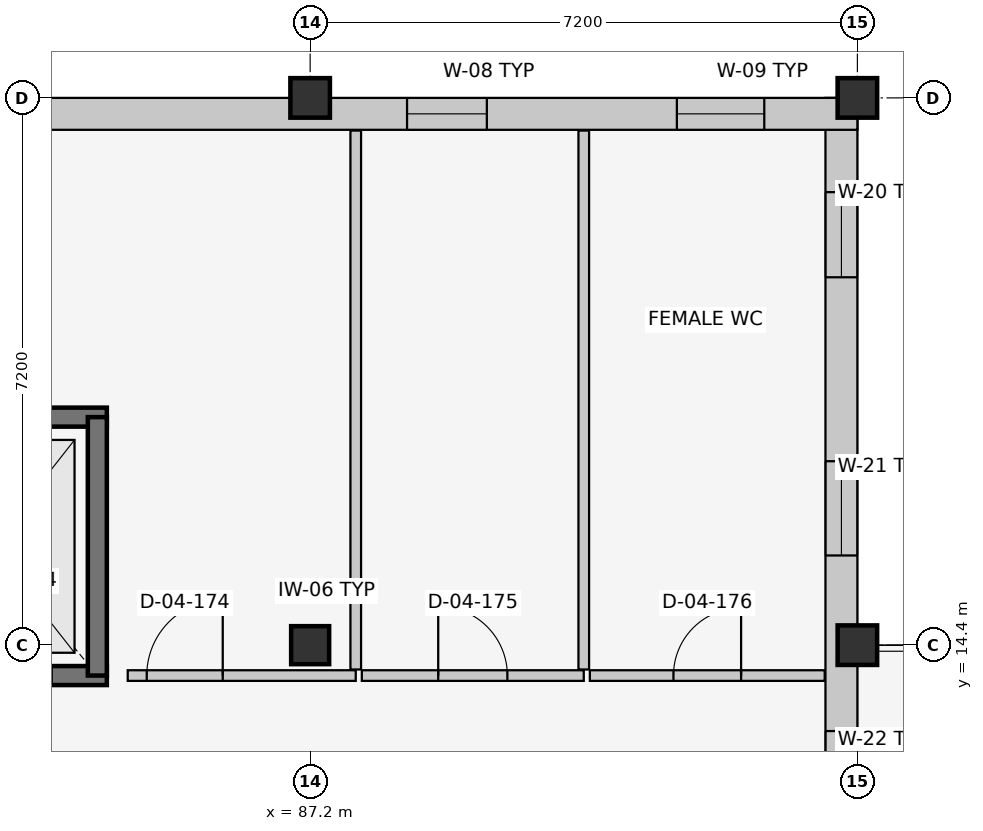
"""IFC4 building model, lengths in metres.
Left out: names, types, materials, properties, quantities, classifications, styles, units other than length and angle.
Written with IfcOpenShell. Run it as: python <this file> out.ifc"""

import sys

from ifc_helpers import new_model, si_unit, direction, frame, frame_2d, origin, origin_2d, place, context, subcontext, project, spatial, rectangle, extrude, element, fill, save


model = new_model("IFC4")
c1 = context("Model", 3, precision=1e-05, world=origin(), true_north=direction((0.0, 1.0)))
c2 = subcontext(c1, "Body", "Model", "MODEL_VIEW")
j1 = project(units=[si_unit("LENGTHUNIT", "METRE"), si_unit("PLANEANGLEUNIT", "RADIAN")], contexts=[c1])
p1 = place(None, origin())
s1 = spatial("IfcSite", under=j1, at=p1, CompositionType="ELEMENT")
p2 = place(p1, origin())
s2 = spatial("IfcBuilding", under=s1, at=p2, CompositionType="ELEMENT")
p3 = place(p2, frame((0.0, 0.0, 18.0)))
s3 = spatial("IfcBuildingStorey", under=s2, at=p3, CompositionType="ELEMENT", Elevation=18.0)
p4 = place(p3, frame((87.2, 14.4, 0.0), z_axis=(0.0, 0.0, 1.0), x_axis=(1.0, 0.0, 0.0)))
e1 = element("IfcColumn", 1, at=p4, inside=s3, PredefinedType="COLUMN", context=c2, shape_type="SweptSolid", body=[
    extrude(rectangle(XDim=0.5, YDim=0.5, at=origin_2d()), origin(), (0.0, 0.0, 1.0), 3.9),
])
for number, where, z_axis, x_axis in (
    (2, (87.2, 21.6, 0.0), (0.0, 0.0, 1.0), (1.0, 0.0, 0.0)),
    (3, (94.4, 14.4, 0.0), (0.0, 0.0, 1.0), (1.0, 0.0, 0.0)),
    (4, (94.4, 21.6, 0.0), (0.0, 0.0, 1.0), (1.0, 0.0, 0.0)),
):
    element("IfcColumn", number, at=place(p3, frame(where, z_axis=z_axis, x_axis=x_axis)), inside=s3, PredefinedType="COLUMN", context=c2, shape_type="SweptSolid", body=[
        extrude(rectangle(XDim=0.52, YDim=0.52, at=origin_2d()), origin(), (0.0, 0.0, 1.0), 3.9),
    ])
p5 = place(p3, frame((94.19, 21.6, 0.0), z_axis=(0.0, 0.0, 1.0), x_axis=(0.0, -1.0, 0.0)))
e5 = element("IfcWall", 5, at=p5, inside=s3, PredefinedType="SOLIDWALL", context=c2, shape_type="SweptSolid", body=[
    extrude(rectangle(XDim=21.6, YDim=0.42, at=frame_2d((10.8, 0.0))), origin(), (0.0, 0.0, 1.0), 3.055),
])
p6 = place(p5, frame((15.8, 0.0, 0.0)))
e6 = element("IfcOpeningElement", 6, at=p6, cuts=e5, PredefinedType="OPENING", context=c2, shape_type="SweptSolid", body=[
    extrude(rectangle(XDim=1.6, YDim=2.2, at=frame_2d((0.8, 1.1))), frame((0.0, 0.222, 0.0), z_axis=(0.0, -1.0, 0.0), x_axis=(1.0, 0.0, 0.0)), (0.0, 0.0, 1.0), 0.444),
])
p7 = place(p5, frame((1.24, 0.0, 0.9)))
e7 = element("IfcOpeningElement", 7, at=p7, cuts=e5, PredefinedType="OPENING", context=c2, shape_type="SweptSolid", body=[
    extrude(rectangle(XDim=1.12, YDim=1.75, at=frame_2d((0.56, 0.875))), frame((0.0, 0.222, 0.0), z_axis=(0.0, -1.0, 0.0), x_axis=(1.0, 0.0, 0.0)), (0.0, 0.0, 1.0), 0.444),
])
p8 = place(p5, frame((4.78, 0.0, 0.9)))
e8 = element("IfcOpeningElement", 8, at=p8, cuts=e5, PredefinedType="OPENING", context=c2, shape_type="SweptSolid", body=[
    extrude(rectangle(XDim=1.24, YDim=1.75, at=frame_2d((0.62, 0.875))), frame((0.0, 0.222, 0.0), z_axis=(0.0, -1.0, 0.0), x_axis=(1.0, 0.0, 0.0)), (0.0, 0.0, 1.0), 0.444),
])
p9 = place(p5, frame((8.33, 0.0, 0.9)))
e9 = element("IfcOpeningElement", 9, at=p9, cuts=e5, PredefinedType="OPENING", context=c2, shape_type="SweptSolid", body=[
    extrude(rectangle(XDim=1.34, YDim=1.75, at=frame_2d((0.67, 0.875))), frame((0.0, 0.222, 0.0), z_axis=(0.0, -1.0, 0.0), x_axis=(1.0, 0.0, 0.0)), (0.0, 0.0, 1.0), 0.444),
])
p10 = place(p5, frame((11.88, 0.0, 0.9)))
e10 = element("IfcOpeningElement", 10, at=p10, cuts=e5, PredefinedType="OPENING", context=c2, shape_type="SweptSolid", body=[
    extrude(rectangle(XDim=1.44, YDim=1.75, at=frame_2d((0.72, 0.875))), frame((0.0, 0.222, 0.0), z_axis=(0.0, -1.0, 0.0), x_axis=(1.0, 0.0, 0.0)), (0.0, 0.0, 1.0), 0.444),
])
p11 = place(p5, frame((19.35, 0.0, 0.9)))
e11 = element("IfcOpeningElement", 11, at=p11, cuts=e5, PredefinedType="OPENING", context=c2, shape_type="SweptSolid", body=[
    extrude(rectangle(XDim=0.9, YDim=1.35, at=frame_2d((0.45, 0.675))), frame((0.0, 0.222, 0.0), z_axis=(0.0, -1.0, 0.0), x_axis=(1.0, 0.0, 0.0)), (0.0, 0.0, 1.0), 0.444),
])
p12 = place(p3, frame((65.6, 21.39, 0.0), z_axis=(0.0, 0.0, 1.0), x_axis=(1.0, 0.0, 0.0)))
e12 = element("IfcWall", 12, at=p12, inside=s3, PredefinedType="SOLIDWALL", context=c2, shape_type="SweptSolid", body=[
    extrude(rectangle(XDim=28.8, YDim=0.42, at=frame_2d((14.4, 0.0))), origin(), (0.0, 0.0, 1.0), 2.955),
])
p13 = place(p12, frame((1.3, 0.0, 0.9)))
e13 = element("IfcOpeningElement", 13, at=p13, cuts=e12, PredefinedType="OPENING", context=c2, shape_type="SweptSolid", body=[
    extrude(rectangle(XDim=1.0, YDim=1.35, at=frame_2d((0.5, 0.675))), frame((0.0, 0.222, 0.0), z_axis=(0.0, -1.0, 0.0), x_axis=(1.0, 0.0, 0.0)), (0.0, 0.0, 1.0), 0.444),
])
p14 = place(p12, frame((8.4, 0.0, 0.9)))
e14 = element("IfcOpeningElement", 14, at=p14, cuts=e12, PredefinedType="OPENING", context=c2, shape_type="SweptSolid", body=[
    extrude(rectangle(XDim=1.2, YDim=1.35, at=frame_2d((0.6, 0.675))), frame((0.0, 0.222, 0.0), z_axis=(0.0, -1.0, 0.0), x_axis=(1.0, 0.0, 0.0)), (0.0, 0.0, 1.0), 0.444),
])
p15 = place(p12, frame((11.95, 0.0, 0.9)))
e15 = element("IfcOpeningElement", 15, at=p15, cuts=e12, PredefinedType="OPENING", context=c2, shape_type="SweptSolid", body=[
    extrude(rectangle(XDim=1.3, YDim=1.35, at=frame_2d((0.65, 0.675))), frame((0.0, 0.222, 0.0), z_axis=(0.0, -1.0, 0.0), x_axis=(1.0, 0.0, 0.0)), (0.0, 0.0, 1.0), 0.444),
])
p16 = place(p12, frame((15.5, 0.0, 0.9)))
e16 = element("IfcOpeningElement", 16, at=p16, cuts=e12, PredefinedType="OPENING", context=c2, shape_type="SweptSolid", body=[
    extrude(rectangle(XDim=1.4, YDim=1.35, at=frame_2d((0.7, 0.675))), frame((0.0, 0.222, 0.0), z_axis=(0.0, -1.0, 0.0), x_axis=(1.0, 0.0, 0.0)), (0.0, 0.0, 1.0), 0.444),
])
p17 = place(p12, frame((22.875, 0.0, 0.9)))
e17 = element("IfcOpeningElement", 17, at=p17, cuts=e12, PredefinedType="OPENING", context=c2, shape_type="SweptSolid", body=[
    extrude(rectangle(XDim=1.05, YDim=1.45, at=frame_2d((0.525, 0.725))), frame((0.0, 0.222, 0.0), z_axis=(0.0, -1.0, 0.0), x_axis=(1.0, 0.0, 0.0)), (0.0, 0.0, 1.0), 0.444),
])
p18 = place(p12, frame((26.425, 0.0, 0.9)))
e18 = element("IfcOpeningElement", 18, at=p18, cuts=e12, PredefinedType="OPENING", context=c2, shape_type="SweptSolid", body=[
    extrude(rectangle(XDim=1.15, YDim=1.45, at=frame_2d((0.575, 0.725))), frame((0.0, 0.222, 0.0), z_axis=(0.0, -1.0, 0.0), x_axis=(1.0, 0.0, 0.0)), (0.0, 0.0, 1.0), 0.444),
])
p19 = place(p3, frame((81.475, 14.0, 0.0), z_axis=(0.0, 0.0, 1.0), x_axis=(1.0, 0.0, 0.0)))
e19 = element("IfcWall", 19, at=p19, inside=s3, PredefinedType="SHEAR", context=c2, shape_type="SweptSolid", body=[
    extrude(rectangle(XDim=3.05, YDim=0.25, at=frame_2d((1.525, 0.0))), origin(), (0.0, 0.0, 1.0), 3.66),
])
p20 = place(p19, frame((0.725, 0.0, 0.0)))
e20 = element("IfcOpeningElement", 20, at=p20, cuts=e19, PredefinedType="OPENING", context=c2, shape_type="SweptSolid", body=[
    extrude(rectangle(XDim=1.6, YDim=2.3, at=frame_2d((0.8, 1.15))), frame((0.0, 0.137, 0.0), z_axis=(0.0, -1.0, 0.0), x_axis=(1.0, 0.0, 0.0)), (0.0, 0.0, 1.0), 0.274),
])
p21 = place(p3, frame((84.525, 17.4, 0.0), z_axis=(0.0, 0.0, 1.0), x_axis=(-1.0, 0.0, 0.0)))
e21 = element("IfcWall", 21, at=p21, inside=s3, PredefinedType="SHEAR", context=c2, shape_type="SweptSolid", body=[
    extrude(rectangle(XDim=3.05, YDim=0.25, at=frame_2d((1.525, 0.0))), origin(), (0.0, 0.0, 1.0), 3.66),
])
p22 = place(p3, frame((84.4, 14.0, 0.0), z_axis=(0.0, 0.0, 1.0), x_axis=(0.0, 1.0, 0.0)))
e22 = element("IfcWall", 22, at=p22, inside=s3, PredefinedType="SHEAR", context=c2, shape_type="SweptSolid", body=[
    extrude(rectangle(XDim=3.4, YDim=0.25, at=frame_2d((1.7, 0.0))), origin(), (0.0, 0.0, 1.0), 3.66),
])
p23 = place(p3, frame((84.8, 14.0, 0.0), z_axis=(0.0, 0.0, 1.0), x_axis=(1.0, 0.0, 0.0)))
e23 = element("IfcWall", 23, at=p23, inside=s3, PredefinedType="PARTITIONING", context=c2, shape_type="SweptSolid", body=[
    extrude(rectangle(XDim=3.0, YDim=0.14, at=frame_2d((1.5, 0.0))), origin(), (0.0, 0.0, 1.0), 3.66),
])
p24 = place(p23, frame((0.25, 0.0, 0.0)))
e24 = element("IfcOpeningElement", 24, at=p24, cuts=e23, PredefinedType="OPENING", context=c2, shape_type="SweptSolid", body=[
    extrude(rectangle(XDim=1.0, YDim=2.1, at=frame_2d((0.5, 1.05))), frame((0.0, 0.082, 0.0), z_axis=(0.0, -1.0, 0.0), x_axis=(1.0, 0.0, 0.0)), (0.0, 0.0, 1.0), 0.164),
])
p25 = place(p3, frame((87.8, 14.08, 0.0), z_axis=(0.0, 0.0, 1.0), x_axis=(0.0, 1.0, 0.0)))
e25 = element("IfcWall", 25, at=p25, inside=s3, PredefinedType="PARTITIONING", context=c2, shape_type="SweptSolid", body=[
    extrude(rectangle(XDim=7.09, YDim=0.14, at=frame_2d((3.545, 0.0))), origin(), (0.0, 0.0, 1.0), 3.66),
])
p26 = place(p3, frame((87.88, 14.0, 0.0), z_axis=(0.0, 0.0, 1.0), x_axis=(1.0, 0.0, 0.0)))
e26 = element("IfcWall", 26, at=p26, inside=s3, PredefinedType="PARTITIONING", context=c2, shape_type="SweptSolid", body=[
    extrude(rectangle(XDim=2.92, YDim=0.14, at=frame_2d((1.46, 0.0))), origin(), (0.0, 0.0, 1.0), 3.66),
])
p27 = place(p26, frame((1.005, 0.0, 0.0)))
e27 = element("IfcOpeningElement", 27, at=p27, cuts=e26, PredefinedType="OPENING", context=c2, shape_type="SweptSolid", body=[
    extrude(rectangle(XDim=0.91, YDim=2.06, at=frame_2d((0.455, 1.03))), frame((0.0, 0.082, 0.0), z_axis=(0.0, -1.0, 0.0), x_axis=(1.0, 0.0, 0.0)), (0.0, 0.0, 1.0), 0.164),
])
p28 = place(p3, frame((90.8, 14.08, 0.0), z_axis=(0.0, 0.0, 1.0), x_axis=(0.0, 1.0, 0.0)))
e28 = element("IfcWall", 28, at=p28, inside=s3, PredefinedType="PARTITIONING", context=c2, shape_type="SweptSolid", body=[
    extrude(rectangle(XDim=7.09, YDim=0.14, at=frame_2d((3.545, 0.0))), origin(), (0.0, 0.0, 1.0), 3.275),
])
p29 = place(p3, frame((90.88, 14.0, 0.0), z_axis=(0.0, 0.0, 1.0), x_axis=(1.0, 0.0, 0.0)))
e29 = element("IfcWall", 29, at=p29, inside=s3, PredefinedType="PARTITIONING", context=c2, shape_type="SweptSolid", body=[
    extrude(rectangle(XDim=3.09, YDim=0.14, at=frame_2d((1.545, 0.0))), origin(), (0.0, 0.0, 1.0), 3.66),
])
p30 = place(p29, frame((1.1, 0.0, 0.0)))
e30 = element("IfcOpeningElement", 30, at=p30, cuts=e29, PredefinedType="OPENING", context=c2, shape_type="SweptSolid", body=[
    extrude(rectangle(XDim=0.89, YDim=2.05, at=frame_2d((0.445, 1.025))), frame((0.0, 0.082, 0.0), z_axis=(0.0, -1.0, 0.0), x_axis=(1.0, 0.0, 0.0)), (0.0, 0.0, 1.0), 0.164),
])
p31 = place(p7, origin())
e31 = element("IfcWindow", 31, at=p31, inside=s3, PartitioningType="SINGLE_PANEL", PredefinedType="WINDOW", context=c2, shape_type="SweptSolid", body=[
    extrude(rectangle(XDim=1.12, YDim=1.75, at=frame_2d((0.56, 0.875))), frame((0.0, 0.03, 0.0), z_axis=(0.0, -1.0, 0.0), x_axis=(1.0, 0.0, 0.0)), (0.0, 0.0, 1.0), 0.06),
])
fill(e7, e31)
p32 = place(p8, origin())
e32 = element("IfcWindow", 32, at=p32, inside=s3, PartitioningType="SINGLE_PANEL", PredefinedType="WINDOW", context=c2, shape_type="SweptSolid", body=[
    extrude(rectangle(XDim=1.24, YDim=1.75, at=frame_2d((0.62, 0.875))), frame((0.0, 0.03, 0.0), z_axis=(0.0, -1.0, 0.0), x_axis=(1.0, 0.0, 0.0)), (0.0, 0.0, 1.0), 0.06),
])
fill(e8, e32)
p33 = place(p9, origin())
e33 = element("IfcWindow", 33, at=p33, inside=s3, PartitioningType="SINGLE_PANEL", PredefinedType="WINDOW", context=c2, shape_type="SweptSolid", body=[
    extrude(rectangle(XDim=1.34, YDim=1.75, at=frame_2d((0.67, 0.875))), frame((0.0, 0.03, 0.0), z_axis=(0.0, -1.0, 0.0), x_axis=(1.0, 0.0, 0.0)), (0.0, 0.0, 1.0), 0.06),
])
fill(e9, e33)
p34 = place(p17, origin())
e34 = element("IfcWindow", 34, at=p34, inside=s3, PartitioningType="SINGLE_PANEL", PredefinedType="WINDOW", context=c2, shape_type="SweptSolid", body=[
    extrude(rectangle(XDim=1.05, YDim=1.45, at=frame_2d((0.525, 0.725))), frame((0.0, 0.03, 0.0), z_axis=(0.0, -1.0, 0.0), x_axis=(1.0, 0.0, 0.0)), (0.0, 0.0, 1.0), 0.06),
])
fill(e17, e34)
p35 = place(p18, origin())
e35 = element("IfcWindow", 35, at=p35, inside=s3, PartitioningType="SINGLE_PANEL", PredefinedType="WINDOW", context=c2, shape_type="SweptSolid", body=[
    extrude(rectangle(XDim=1.15, YDim=1.45, at=frame_2d((0.575, 0.725))), frame((0.0, 0.03, 0.0), z_axis=(0.0, -1.0, 0.0), x_axis=(1.0, 0.0, 0.0)), (0.0, 0.0, 1.0), 0.06),
])
fill(e18, e35)
p36 = place(p20, origin())
e36 = element("IfcDoor", 36, at=p36, inside=s3, OperationType="DOUBLE_DOOR_SLIDING", PredefinedType="DOOR", context=c2, shape_type="SweptSolid", body=[
    extrude(rectangle(XDim=1.6, YDim=2.3, at=frame_2d((0.8, 1.15))), frame((0.0, 0.025, 0.0), z_axis=(0.0, -1.0, 0.0), x_axis=(1.0, 0.0, 0.0)), (0.0, 0.0, 1.0), 0.05),
])
fill(e20, e36)
p37 = place(p24, origin())
e37 = element("IfcDoor", 37, at=p37, inside=s3, OperationType="SINGLE_SWING_RIGHT", PredefinedType="DOOR", context=c2, shape_type="SweptSolid", body=[
    extrude(rectangle(XDim=1.0, YDim=2.1, at=frame_2d((0.5, 1.05))), frame((0.0, 0.025, 0.0), z_axis=(0.0, -1.0, 0.0), x_axis=(1.0, 0.0, 0.0)), (0.0, 0.0, 1.0), 0.05),
])
fill(e24, e37)
p38 = place(p27, origin())
e38 = element("IfcDoor", 38, at=p38, inside=s3, OperationType="SINGLE_SWING_LEFT", PredefinedType="DOOR", context=c2, shape_type="SweptSolid", body=[
    extrude(rectangle(XDim=0.91, YDim=2.06, at=frame_2d((0.455, 1.03))), frame((0.0, 0.025, 0.0), z_axis=(0.0, -1.0, 0.0), x_axis=(1.0, 0.0, 0.0)), (0.0, 0.0, 1.0), 0.05),
])
fill(e27, e38)
p39 = place(p30, origin())
e39 = element("IfcDoor", 39, at=p39, inside=s3, OperationType="SINGLE_SWING_RIGHT", PredefinedType="DOOR", context=c2, shape_type="SweptSolid", body=[
    extrude(rectangle(XDim=0.89, YDim=2.05, at=frame_2d((0.445, 1.025))), frame((0.0, 0.025, 0.0), z_axis=(0.0, -1.0, 0.0), x_axis=(1.0, 0.0, 0.0)), (0.0, 0.0, 1.0), 0.05),
])
fill(e30, e39)
save(model, sys.argv[1])
